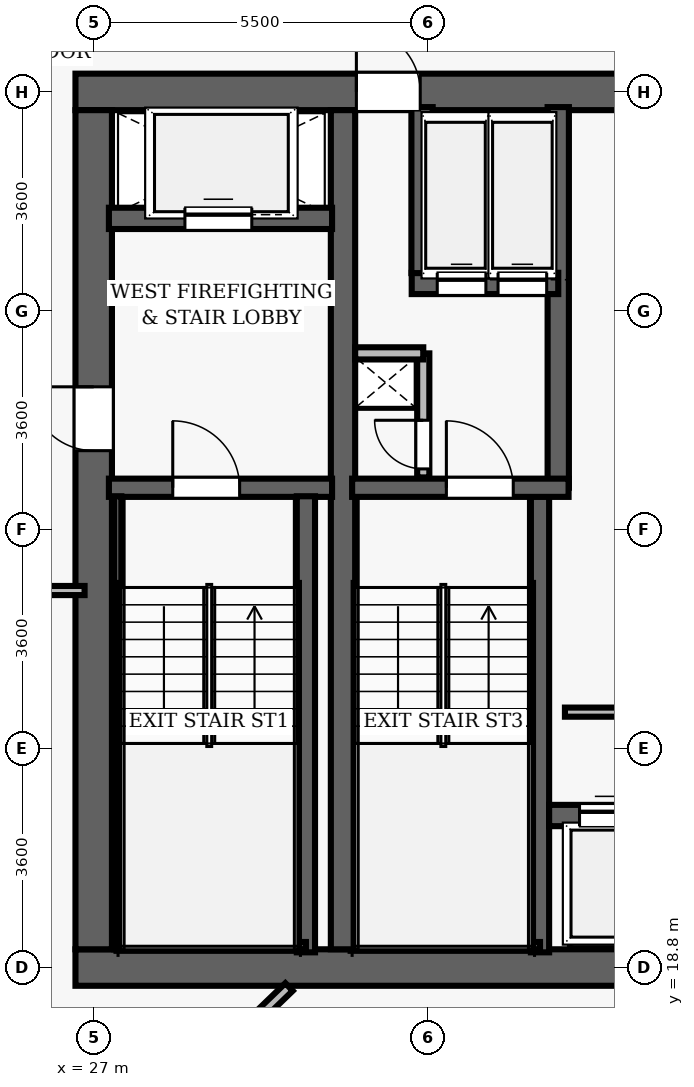
"""IFC4 building model, lengths in metres.
Left out: names, types, materials, properties, quantities, classifications, styles, units other than length and angle.
Written with IfcOpenShell. Run it as: python <this file> out.ifc"""

import sys

from ifc_helpers import new_model, si_unit, direction, frame, frame_2d, origin, place, context, subcontext, project, spatial, rectangle, extrude, element, fill, save


model = new_model("IFC4")
c1 = context("Model", 3, precision=1e-05, world=origin(), true_north=direction((0.0, 1.0)))
c2 = subcontext(c1, "Body", "Model", "MODEL_VIEW")
j1 = project(units=[si_unit("LENGTHUNIT", "METRE"), si_unit("PLANEANGLEUNIT", "RADIAN")], contexts=[c1])
p1 = place(None, origin())
s1 = spatial("IfcSite", under=j1, at=p1, CompositionType="ELEMENT")
p2 = place(p1, origin())
s2 = spatial("IfcBuilding", under=s1, at=p2, CompositionType="ELEMENT")
p3 = place(p2, frame((0.0, 0.0, 141.3)))
s3 = spatial("IfcBuildingStorey", under=s2, at=p3, CompositionType="ELEMENT", Elevation=141.3)
p4 = place(p3, frame((26.7, 18.8, 0.0), z_axis=(0.0, 0.0, 1.0), x_axis=(1.0, 0.0, 0.0)))
e1 = element("IfcWall", 1, at=p4, inside=s3, PredefinedType="SHEAR", context=c2, shape_type="SweptSolid", body=[
    extrude(rectangle(XDim=22.6, YDim=0.6, at=frame_2d((11.3, 0.0))), origin(), (0.0, 0.0, 1.0), 3.5),
])
p5 = place(p4, frame((14.52, 0.0, 0.0)))
e2 = element("IfcOpeningElement", 2, at=p5, cuts=e1, PredefinedType="OPENING", context=c2, shape_type="SweptSolid", body=[
    extrude(rectangle(XDim=1.05, YDim=2.15, at=frame_2d((0.525, 1.075))), frame((0.0, 0.31, 0.0), z_axis=(0.0, -1.0, 0.0), x_axis=(1.0, 0.0, 0.0)), (0.0, 0.0, 1.0), 0.62),
])
p6 = place(p3, frame((26.7, 33.2, 0.0), z_axis=(0.0, 0.0, 1.0), x_axis=(1.0, 0.0, 0.0)))
e3 = element("IfcWall", 3, at=p6, inside=s3, PredefinedType="SHEAR", context=c2, shape_type="SweptSolid", body=[
    extrude(rectangle(XDim=22.6, YDim=0.6, at=frame_2d((11.3, 0.0))), origin(), (0.0, 0.0, 1.0), 3.5),
])
p7 = place(p6, frame((4.62, 0.0, 0.0)))
e4 = element("IfcOpeningElement", 4, at=p7, cuts=e3, PredefinedType="OPENING", context=c2, shape_type="SweptSolid", body=[
    extrude(rectangle(XDim=1.05, YDim=2.15, at=frame_2d((0.525, 1.075))), frame((0.0, 0.31, 0.0), z_axis=(0.0, -1.0, 0.0), x_axis=(1.0, 0.0, 0.0)), (0.0, 0.0, 1.0), 0.62),
])
p8 = place(p6, frame((14.52, 0.0, 0.0)))
e5 = element("IfcOpeningElement", 5, at=p8, cuts=e3, PredefinedType="OPENING", context=c2, shape_type="SweptSolid", body=[
    extrude(rectangle(XDim=1.05, YDim=2.15, at=frame_2d((0.525, 1.075))), frame((0.0, 0.31, 0.0), z_axis=(0.0, -1.0, 0.0), x_axis=(1.0, 0.0, 0.0)), (0.0, 0.0, 1.0), 0.62),
])
p9 = place(p3, frame((27.0, 19.1, 0.0), z_axis=(0.0, 0.0, 1.0), x_axis=(0.0, 1.0, 0.0)))
e6 = element("IfcWall", 6, at=p9, inside=s3, PredefinedType="SHEAR", context=c2, shape_type="SweptSolid", body=[
    extrude(rectangle(XDim=13.8, YDim=0.6, at=frame_2d((6.9, 0.0))), origin(), (0.0, 0.0, 1.0), 3.5),
])
p10 = place(p9, frame((8.2, 0.0, 0.0)))
e7 = element("IfcOpeningElement", 7, at=p10, cuts=e6, PredefinedType="OPENING", context=c2, shape_type="SweptSolid", body=[
    extrude(rectangle(XDim=1.05, YDim=2.15, at=frame_2d((0.525, 1.075))), frame((0.0, 0.31, 0.0), z_axis=(0.0, -1.0, 0.0), x_axis=(1.0, 0.0, 0.0)), (0.0, 0.0, 1.0), 0.62),
])
p11 = place(p3, frame((31.1, 19.1, 0.0), z_axis=(0.0, 0.0, 1.0), x_axis=(0.0, 1.0, 0.0)))
e8 = element("IfcWall", 8, at=p11, inside=s3, PredefinedType="SHEAR", context=c2, shape_type="SweptSolid", body=[
    extrude(rectangle(XDim=13.8, YDim=0.4, at=frame_2d((6.9, 0.0))), origin(), (0.0, 0.0, 1.0), 3.5),
])
p12 = place(p3, frame((27.25, 26.69, 0.0), z_axis=(0.0, 0.0, 1.0), x_axis=(1.0, 0.0, 0.0)))
e9 = element("IfcWall", 9, at=p12, inside=s3, PredefinedType="SHEAR", context=c2, shape_type="SweptSolid", body=[
    extrude(rectangle(XDim=3.67, YDim=0.3, at=frame_2d((1.835, 0.0))), origin(), (0.0, 0.0, 1.0), 3.5),
])
p13 = place(p12, frame((1.05, 0.0, 0.0)))
e10 = element("IfcOpeningElement", 10, at=p13, cuts=e9, PredefinedType="OPENING", context=c2, shape_type="SweptSolid", body=[
    extrude(rectangle(XDim=1.1, YDim=2.15, at=frame_2d((0.55, 1.075))), frame((0.0, 0.16, 0.0), z_axis=(0.0, -1.0, 0.0), x_axis=(1.0, 0.0, 0.0)), (0.0, 0.0, 1.0), 0.32),
])
p14 = place(p3, frame((30.49, 19.05, 0.0), z_axis=(0.0, 0.0, 1.0), x_axis=(0.0, 1.0, 0.0)))
e11 = element("IfcWall", 11, at=p14, inside=s3, PredefinedType="SHEAR", context=c2, shape_type="SweptSolid", body=[
    extrude(rectangle(XDim=7.5, YDim=0.3, at=frame_2d((3.75, 0.0))), origin(), (0.0, 0.0, 1.0), 3.5),
])
p15 = place(p3, frame((27.395, 19.1, 0.0), z_axis=(0.0, 0.0, 1.0), x_axis=(0.0, 1.0, 0.0)))
e12 = element("IfcWall", 12, at=p15, inside=s3, PredefinedType="SHEAR", context=c2, shape_type="SweptSolid", body=[
    extrude(rectangle(XDim=7.45, YDim=0.12, at=frame_2d((3.725, 0.0))), origin(), (0.0, 0.0, 1.0), 3.5),
])
p16 = place(p3, frame((27.395, 19.16, 0.0), z_axis=(0.0, 0.0, 1.0), x_axis=(1.0, 0.0, 0.0)))
e13 = element("IfcWall", 13, at=p16, inside=s3, PredefinedType="SHEAR", context=c2, shape_type="SweptSolid", body=[
    extrude(rectangle(XDim=3.095, YDim=0.12, at=frame_2d((1.547, 0.0))), origin(), (0.0, 0.0, 1.0), 3.5),
])
p17 = place(p3, frame((27.25, 31.12, 0.0), z_axis=(0.0, 0.0, 1.0), x_axis=(1.0, 0.0, 0.0)))
e14 = element("IfcWall", 14, at=p17, inside=s3, PredefinedType="SHEAR", context=c2, shape_type="SweptSolid", body=[
    extrude(rectangle(XDim=3.67, YDim=0.35, at=frame_2d((1.835, 0.0))), origin(), (0.0, 0.0, 1.0), 2.675),
])
p18 = place(p17, frame((1.25, 0.0, 0.0)))
e15 = element("IfcOpeningElement", 15, at=p18, cuts=e14, PredefinedType="OPENING", context=c2, shape_type="SweptSolid", body=[
    extrude(rectangle(XDim=1.1, YDim=2.15, at=frame_2d((0.55, 1.075))), frame((0.0, 0.185, 0.0), z_axis=(0.0, -1.0, 0.0), x_axis=(1.0, 0.0, 0.0)), (0.0, 0.0, 1.0), 0.37),
])
p19 = place(p3, frame((34.34, 19.05, 0.0), z_axis=(0.0, 0.0, 1.0), x_axis=(0.0, 1.0, 0.0)))
e16 = element("IfcWall", 16, at=p19, inside=s3, PredefinedType="SHEAR", context=c2, shape_type="SweptSolid", body=[
    extrude(rectangle(XDim=7.5, YDim=0.3, at=frame_2d((3.75, 0.0))), origin(), (0.0, 0.0, 1.0), 3.5),
])
p20 = place(p3, frame((34.64, 26.69, 0.0), z_axis=(0.0, 0.0, 1.0), x_axis=(0.0, 1.0, 0.0)))
e17 = element("IfcWall", 17, at=p20, inside=s3, PredefinedType="SHEAR", context=c2, shape_type="SweptSolid", body=[
    extrude(rectangle(XDim=6.26, YDim=0.35, at=frame_2d((3.13, 0.0))), origin(), (0.0, 0.0, 1.0), 3.5),
])
p21 = place(p3, frame((31.25, 26.69, 0.0), z_axis=(0.0, 0.0, 1.0), x_axis=(1.0, 0.0, 0.0)))
e18 = element("IfcWall", 18, at=p21, inside=s3, PredefinedType="SHEAR", context=c2, shape_type="SweptSolid", body=[
    extrude(rectangle(XDim=3.56, YDim=0.3, at=frame_2d((1.78, 0.0))), origin(), (0.0, 0.0, 1.0), 3.5),
])
p22 = place(p21, frame((1.55, 0.0, 0.0)))
e19 = element("IfcOpeningElement", 19, at=p22, cuts=e18, PredefinedType="OPENING", context=c2, shape_type="SweptSolid", body=[
    extrude(rectangle(XDim=1.1, YDim=2.15, at=frame_2d((0.55, 1.075))), frame((0.0, 0.16, 0.0), z_axis=(0.0, -1.0, 0.0), x_axis=(1.0, 0.0, 0.0)), (0.0, 0.0, 1.0), 0.32),
])
p23 = place(p3, frame((31.3, 19.16, 0.0), z_axis=(0.0, 0.0, 1.0), x_axis=(1.0, 0.0, 0.0)))
e20 = element("IfcWall", 20, at=p23, inside=s3, PredefinedType="SHEAR", context=c2, shape_type="SweptSolid", body=[
    extrude(rectangle(XDim=3.04, YDim=0.12, at=frame_2d((1.52, 0.0))), origin(), (0.0, 0.0, 1.0), 3.5),
])
p24 = place(p3, frame((32.23, 30.05, 0.0), z_axis=(0.0, 0.0, 1.0), x_axis=(1.0, 0.0, 0.0)))
e21 = element("IfcWall", 21, at=p24, inside=s3, PredefinedType="SHEAR", context=c2, shape_type="SweptSolid", body=[
    extrude(rectangle(XDim=2.41, YDim=0.35, at=frame_2d((1.205, 0.0))), origin(), (0.0, 0.0, 1.0), 2.675),
])
p25 = place(p24, frame((0.42, 0.0, 0.0)))
e22 = element("IfcOpeningElement", 22, at=p25, cuts=e21, PredefinedType="OPENING", context=c2, shape_type="SweptSolid", body=[
    extrude(rectangle(XDim=0.8, YDim=2.15, at=frame_2d((0.4, 1.075))), frame((0.0, 0.185, 0.0), z_axis=(0.0, -1.0, 0.0), x_axis=(1.0, 0.0, 0.0)), (0.0, 0.0, 1.0), 0.37),
])
p26 = place(p24, frame((1.42, 0.0, 0.0)))
e23 = element("IfcOpeningElement", 23, at=p26, cuts=e21, PredefinedType="OPENING", context=c2, shape_type="SweptSolid", body=[
    extrude(rectangle(XDim=0.8, YDim=2.15, at=frame_2d((0.4, 1.075))), frame((0.0, 0.185, 0.0), z_axis=(0.0, -1.0, 0.0), x_axis=(1.0, 0.0, 0.0)), (0.0, 0.0, 1.0), 0.37),
])
p27 = place(p3, frame((32.4, 30.22, 0.0), z_axis=(0.0, 0.0, 1.0), x_axis=(0.0, 1.0, 0.0)))
e24 = element("IfcWall", 24, at=p27, inside=s3, PredefinedType="SHEAR", context=c2, shape_type="SweptSolid", body=[
    extrude(rectangle(XDim=2.73, YDim=0.35, at=frame_2d((1.365, 0.0))), origin(), (0.0, 0.0, 1.0), 2.675),
])
p28 = place(p3, frame((32.42, 26.86, 0.0), z_axis=(0.0, 0.0, 1.0), x_axis=(0.0, 1.0, 0.0)))
e25 = element("IfcWall", 25, at=p28, inside=s3, PredefinedType="PARTITIONING", context=c2, shape_type="SweptSolid", body=[
    extrude(rectangle(XDim=2.04, YDim=0.2, at=frame_2d((1.02, 0.0))), origin(), (0.0, 0.0, 1.0), 2.675),
])
p29 = place(p28, frame((0.14, 0.0, 0.0)))
e26 = element("IfcOpeningElement", 26, at=p29, cuts=e25, PredefinedType="OPENING", context=c2, shape_type="SweptSolid", body=[
    extrude(rectangle(XDim=0.8, YDim=2.05, at=frame_2d((0.4, 1.025))), frame((0.0, 0.11, 0.0), z_axis=(0.0, -1.0, 0.0), x_axis=(1.0, 0.0, 0.0)), (0.0, 0.0, 1.0), 0.22),
])
p30 = place(p3, frame((31.3, 28.9, 0.0), z_axis=(0.0, 0.0, 1.0), x_axis=(1.0, 0.0, 0.0)))
e27 = element("IfcWall", 27, at=p30, inside=s3, PredefinedType="PARTITIONING", context=c2, shape_type="SweptSolid", body=[
    extrude(rectangle(XDim=1.12, YDim=0.2, at=frame_2d((0.56, 0.0))), origin(), (0.0, 0.0, 1.0), 2.675),
])
p31 = place(p3, frame((34.49, 21.3, 0.0), z_axis=(0.0, 0.0, 1.0), x_axis=(1.0, 0.0, 0.0)))
e28 = element("IfcWall", 28, at=p31, inside=s3, PredefinedType="SHEAR", context=c2, shape_type="SweptSolid", body=[
    extrude(rectangle(XDim=6.68, YDim=0.35, at=frame_2d((3.34, 0.0))), origin(), (0.0, 0.0, 1.0), 2.675),
])
p32 = place(p31, frame((0.5, 0.0, 0.0)))
e29 = element("IfcOpeningElement", 29, at=p32, cuts=e28, PredefinedType="OPENING", context=c2, shape_type="SweptSolid", body=[
    extrude(rectangle(XDim=0.9, YDim=2.15, at=frame_2d((0.45, 1.075))), frame((0.0, 0.185, 0.0), z_axis=(0.0, -1.0, 0.0), x_axis=(1.0, 0.0, 0.0)), (0.0, 0.0, 1.0), 0.37),
])
p33 = place(p31, frame((2.58, 0.0, 0.0)))
e30 = element("IfcOpeningElement", 30, at=p33, cuts=e28, PredefinedType="OPENING", context=c2, shape_type="SweptSolid", body=[
    extrude(rectangle(XDim=0.9, YDim=2.15, at=frame_2d((0.45, 1.075))), frame((0.0, 0.185, 0.0), z_axis=(0.0, -1.0, 0.0), x_axis=(1.0, 0.0, 0.0)), (0.0, 0.0, 1.0), 0.37),
])
p34 = place(p31, frame((4.66, 0.0, 0.0)))
e31 = element("IfcOpeningElement", 31, at=p34, cuts=e28, PredefinedType="OPENING", context=c2, shape_type="SweptSolid", body=[
    extrude(rectangle(XDim=0.9, YDim=2.15, at=frame_2d((0.45, 1.075))), frame((0.0, 0.185, 0.0), z_axis=(0.0, -1.0, 0.0), x_axis=(1.0, 0.0, 0.0)), (0.0, 0.0, 1.0), 0.37),
])
p35 = place(p3, frame((34.75, 23.0, 0.0), z_axis=(0.0, 0.0, 1.0), x_axis=(1.0, 0.0, 0.0)))
e32 = element("IfcWall", 32, at=p35, inside=s3, PredefinedType="PARTITIONING", context=c2, shape_type="SweptSolid", body=[
    extrude(rectangle(XDim=6.25, YDim=0.15, at=frame_2d((3.125, 0.0))), origin(), (0.0, 0.0, 1.0), 2.675),
])
p36 = place(p3, frame((14.556, 25.0, 0.0), z_axis=(0.0, 0.0, 1.0), x_axis=(1.0, 0.0, 0.0)))
e33 = element("IfcWall", 33, at=p36, inside=s3, PredefinedType="PARTITIONING", context=c2, shape_type="SweptSolid", body=[
    extrude(rectangle(XDim=12.294, YDim=0.15, at=frame_2d((6.147, 0.0))), origin(), (0.0, 0.0, 1.0), 2.675),
])
p37 = place(p36, frame((9.885, 0.0, 0.0)))
e34 = element("IfcOpeningElement", 34, at=p37, cuts=e33, PredefinedType="OPENING", context=c2, shape_type="SweptSolid", body=[
    extrude(rectangle(XDim=0.95, YDim=2.15, at=frame_2d((0.475, 1.075))), frame((0.0, 0.085, 0.0), z_axis=(0.0, -1.0, 0.0), x_axis=(1.0, 0.0, 0.0)), (0.0, 0.0, 1.0), 0.17),
])
p38 = place(p3, frame((30.213, 18.48, 0.0), z_axis=(0.0, 0.0, 1.0), x_axis=(-0.719342032924, -0.694656058542, 0.0)))
e35 = element("IfcWall", 35, at=p38, inside=s3, PredefinedType="PARTITIONING", context=c2, shape_type="SweptSolid", body=[
    extrude(rectangle(XDim=12.105, YDim=0.175, at=frame_2d((6.053, 0.0))), origin(), (0.0, 0.0, 1.0), 2.675),
])
p39 = place(p13, origin())
e36 = element("IfcDoor", 36, at=p39, inside=s3, OperationType="SINGLE_SWING_LEFT", PredefinedType="DOOR", context=c2, shape_type="SweptSolid", body=[
    extrude(rectangle(XDim=1.1, YDim=2.15, at=frame_2d((0.55, 1.075))), frame((0.0, 0.025, 0.0), z_axis=(0.0, -1.0, 0.0), x_axis=(1.0, 0.0, 0.0)), (0.0, 0.0, 1.0), 0.05),
])
fill(e10, e36)
p40 = place(p10, origin())
e37 = element("IfcDoor", 37, at=p40, inside=s3, OperationType="SINGLE_SWING_RIGHT", PredefinedType="DOOR", context=c2, shape_type="SweptSolid", body=[
    extrude(rectangle(XDim=1.05, YDim=2.15, at=frame_2d((0.525, 1.075))), frame((0.0, 0.025, 0.0), z_axis=(0.0, -1.0, 0.0), x_axis=(1.0, 0.0, 0.0)), (0.0, 0.0, 1.0), 0.05),
])
fill(e7, e37)
p41 = place(p22, origin())
e38 = element("IfcDoor", 38, at=p41, inside=s3, OperationType="SINGLE_SWING_LEFT", PredefinedType="DOOR", context=c2, shape_type="SweptSolid", body=[
    extrude(rectangle(XDim=1.1, YDim=2.15, at=frame_2d((0.55, 1.075))), frame((0.0, 0.025, 0.0), z_axis=(0.0, -1.0, 0.0), x_axis=(1.0, 0.0, 0.0)), (0.0, 0.0, 1.0), 0.05),
])
fill(e19, e38)
p42 = place(p29, origin())
e39 = element("IfcDoor", 39, at=p42, inside=s3, OperationType="SINGLE_SWING_RIGHT", PredefinedType="DOOR", context=c2, shape_type="SweptSolid", body=[
    extrude(rectangle(XDim=0.8, YDim=2.05, at=frame_2d((0.4, 1.025))), frame((0.0, 0.025, 0.0), z_axis=(0.0, -1.0, 0.0), x_axis=(1.0, 0.0, 0.0)), (0.0, 0.0, 1.0), 0.05),
])
fill(e26, e39)
p43 = place(p7, origin())
e40 = element("IfcDoor", 40, at=p43, inside=s3, OperationType="SINGLE_SWING_LEFT", PredefinedType="DOOR", context=c2, shape_type="SweptSolid", body=[
    extrude(rectangle(XDim=1.05, YDim=2.15, at=frame_2d((0.525, 1.075))), frame((0.0, 0.025, 0.0), z_axis=(0.0, -1.0, 0.0), x_axis=(1.0, 0.0, 0.0)), (0.0, 0.0, 1.0), 0.05),
])
fill(e4, e40)
p44 = place(p32, origin())
e41 = element("IfcDoor", 41, at=p44, inside=s3, OperationType="SLIDING_TO_LEFT", PredefinedType="DOOR", context=c2, shape_type="SweptSolid", body=[
    extrude(rectangle(XDim=0.9, YDim=2.15, at=frame_2d((0.45, 1.075))), frame((0.0, 0.025, 0.0), z_axis=(0.0, -1.0, 0.0), x_axis=(1.0, 0.0, 0.0)), (0.0, 0.0, 1.0), 0.05),
])
fill(e29, e41)
p45 = place(p18, origin())
e42 = element("IfcDoor", 42, at=p45, inside=s3, OperationType="SLIDING_TO_LEFT", PredefinedType="DOOR", context=c2, shape_type="SweptSolid", body=[
    extrude(rectangle(XDim=1.1, YDim=2.15, at=frame_2d((0.55, 1.075))), frame((0.0, 0.025, 0.0), z_axis=(0.0, -1.0, 0.0), x_axis=(1.0, 0.0, 0.0)), (0.0, 0.0, 1.0), 0.05),
])
fill(e15, e42)
p46 = place(p25, origin())
e43 = element("IfcDoor", 43, at=p46, inside=s3, OperationType="SLIDING_TO_LEFT", PredefinedType="DOOR", context=c2, shape_type="SweptSolid", body=[
    extrude(rectangle(XDim=0.8, YDim=2.15, at=frame_2d((0.4, 1.075))), frame((0.0, 0.025, 0.0), z_axis=(0.0, -1.0, 0.0), x_axis=(1.0, 0.0, 0.0)), (0.0, 0.0, 1.0), 0.05),
])
fill(e22, e43)
p47 = place(p26, origin())
e44 = element("IfcDoor", 44, at=p47, inside=s3, OperationType="SLIDING_TO_LEFT", PredefinedType="DOOR", context=c2, shape_type="SweptSolid", body=[
    extrude(rectangle(XDim=0.8, YDim=2.15, at=frame_2d((0.4, 1.075))), frame((0.0, 0.025, 0.0), z_axis=(0.0, -1.0, 0.0), x_axis=(1.0, 0.0, 0.0)), (0.0, 0.0, 1.0), 0.05),
])
fill(e23, e44)
save(model, sys.argv[1])
